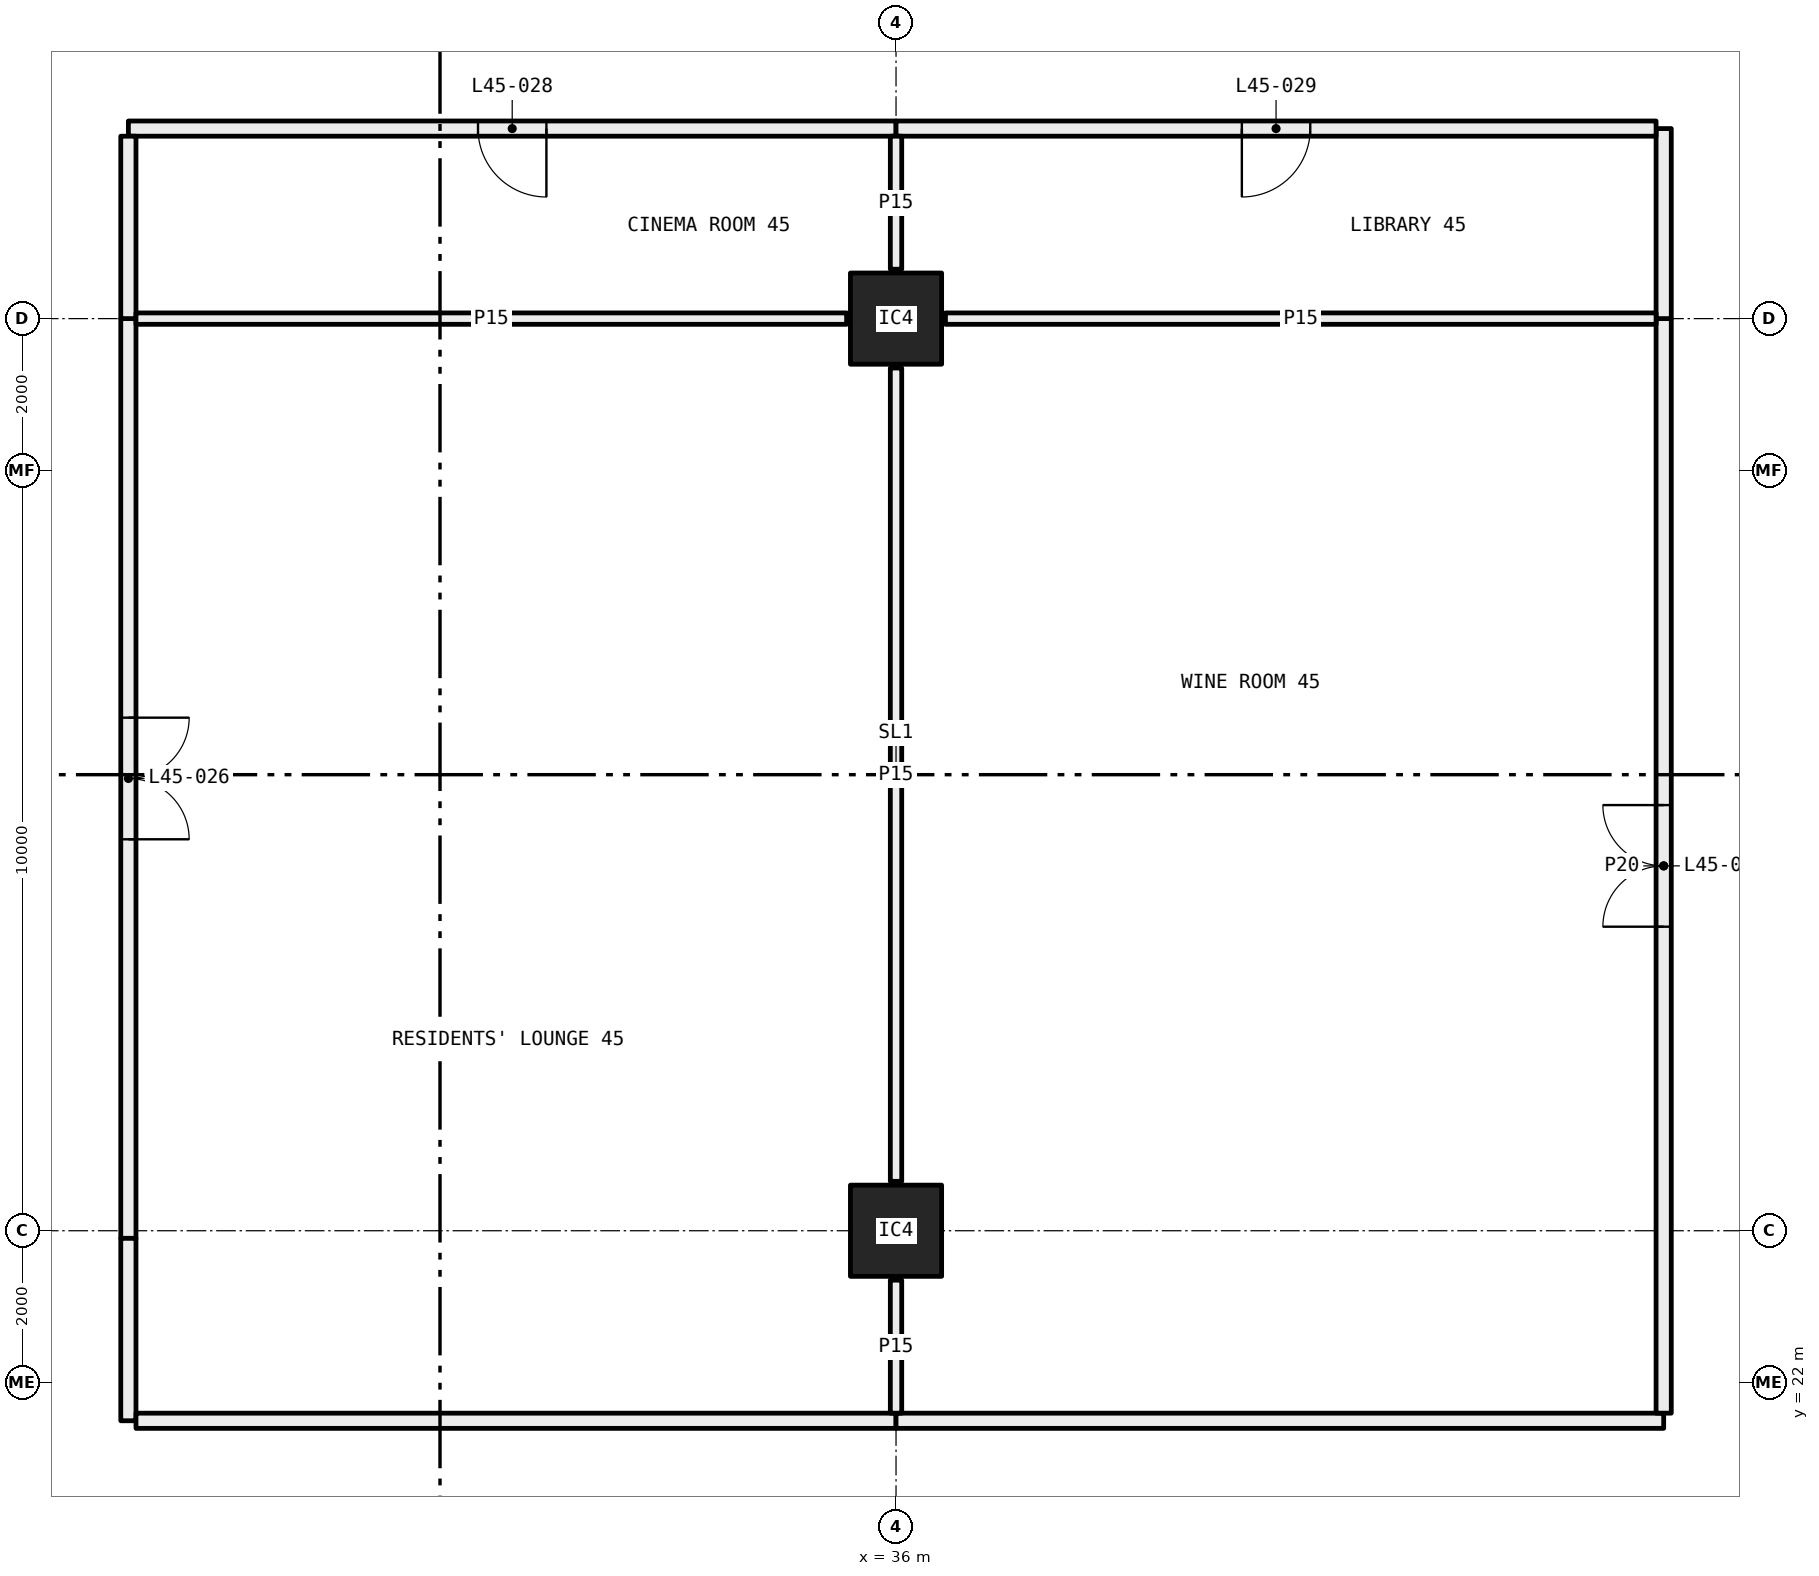
"""IFC4 building model, lengths in metres.
Left out: names, types, materials, properties, quantities, classifications, styles, units other than length and angle.
Written with IfcOpenShell. Run it as: python <this file> out.ifc"""

import sys

from ifc_helpers import new_model, si_unit, direction, frame, frame_2d, origin, origin_2d, place, context, subcontext, project, spatial, rectangle, hollow_rectangle, extrude, element, fill, save


model = new_model("IFC4")
c1 = context("Model", 3, precision=1e-05, world=origin(), true_north=direction((0.0, 1.0)))
c2 = subcontext(c1, "Body", "Model", "MODEL_VIEW")
j1 = project(units=[si_unit("LENGTHUNIT", "METRE"), si_unit("PLANEANGLEUNIT", "RADIAN")], contexts=[c1])
p1 = place(None, origin())
s1 = spatial("IfcSite", under=j1, at=p1, CompositionType="ELEMENT")
p2 = place(p1, origin())
s2 = spatial("IfcBuilding", under=s1, at=p2, CompositionType="ELEMENT")
p3 = place(p2, frame((0.0, 0.0, 172.05)))
s3 = spatial("IfcBuildingStorey", under=s2, at=p3, CompositionType="ELEMENT", Elevation=172.05)
for number, where, z_axis, x_axis in (
    (1, (36.0, 24.0, 0.0), (0.0, 0.0, 1.0), (1.0, 0.0, 0.0)),
    (2, (36.0, 36.0, 0.0), (0.0, 0.0, 1.0), (1.0, 0.0, 0.0)),
):
    element("IfcColumn", number, at=place(p3, frame(where, z_axis=z_axis, x_axis=x_axis)), inside=s3, PredefinedType="COLUMN", context=c2, shape_type="SweptSolid", body=[
        extrude(hollow_rectangle(XDim=1.2, YDim=1.2, WallThickness=0.05, at=origin_2d()), origin(), (0.0, 0.0, 1.0), 3.05),
    ])
p4 = place(p3, frame((25.9, 36.0, 0.0), z_axis=(0.0, 0.0, 1.0), x_axis=(0.0, -1.0, 0.0)))
e3 = element("IfcWall", 3, at=p4, inside=s3, PredefinedType="PARTITIONING", context=c2, shape_type="SweptSolid", body=[
    extrude(rectangle(XDim=12.1, YDim=0.2, at=frame_2d((6.05, 0.0))), origin(), (0.0, 0.0, 1.0), 2.45),
])
p5 = place(p4, frame((5.25, 0.0, 0.0)))
e4 = element("IfcOpeningElement", 4, at=p5, cuts=e3, PredefinedType="OPENING", context=c2, shape_type="SweptSolid", body=[
    extrude(rectangle(XDim=1.6, YDim=2.1, at=frame_2d((0.8, 1.05))), frame((0.0, 0.11, 0.0), z_axis=(0.0, -1.0, 0.0), x_axis=(1.0, 0.0, 0.0)), (0.0, 0.0, 1.0), 0.22),
])
p6 = place(p3, frame((25.9, 23.9, 0.0), z_axis=(0.0, 0.0, 1.0), x_axis=(0.0, -1.0, 0.0)))
e5 = element("IfcWall", 5, at=p6, inside=s3, PredefinedType="PARTITIONING", context=c2, shape_type="SweptSolid", body=[
    extrude(rectangle(XDim=2.4, YDim=0.2, at=frame_2d((1.2, 0.0))), origin(), (0.0, 0.0, 1.0), 3.05),
])
p7 = place(p3, frame((26.0, 21.5, 0.0), z_axis=(0.0, 0.0, 1.0), x_axis=(1.0, 0.0, 0.0)))
e6 = element("IfcWall", 6, at=p7, inside=s3, PredefinedType="PARTITIONING", context=c2, shape_type="SweptSolid", body=[
    extrude(rectangle(XDim=10.0, YDim=0.2, at=frame_2d((5.0, 0.0))), origin(), (0.0, 0.0, 1.0), 2.45),
])
p8 = place(p3, frame((36.0, 21.5, 0.0), z_axis=(0.0, 0.0, 1.0), x_axis=(1.0, 0.0, 0.0)))
e7 = element("IfcWall", 7, at=p8, inside=s3, PredefinedType="PARTITIONING", context=c2, shape_type="SweptSolid", body=[
    extrude(rectangle(XDim=10.1, YDim=0.2, at=frame_2d((5.05, 0.0))), origin(), (0.0, 0.0, 1.0), 2.45),
])
p9 = place(p3, frame((46.1, 21.6, 0.0), z_axis=(0.0, 0.0, 1.0), x_axis=(0.0, 1.0, 0.0)))
e8 = element("IfcWall", 8, at=p9, inside=s3, PredefinedType="PARTITIONING", context=c2, shape_type="SweptSolid", body=[
    extrude(rectangle(XDim=14.4, YDim=0.2, at=frame_2d((7.2, 0.0))), origin(), (0.0, 0.0, 1.0), 2.45),
])
p10 = place(p9, frame((6.4, 0.0, 0.0)))
e9 = element("IfcOpeningElement", 9, at=p10, cuts=e8, PredefinedType="OPENING", context=c2, shape_type="SweptSolid", body=[
    extrude(rectangle(XDim=1.6, YDim=2.1, at=frame_2d((0.8, 1.05))), frame((0.0, 0.11, 0.0), z_axis=(0.0, -1.0, 0.0), x_axis=(1.0, 0.0, 0.0)), (0.0, 0.0, 1.0), 0.22),
])
p11 = place(p3, frame((36.0, 38.5, 0.0), z_axis=(0.0, 0.0, 1.0), x_axis=(-1.0, 0.0, 0.0)))
e10 = element("IfcWall", 10, at=p11, inside=s3, PredefinedType="PARTITIONING", context=c2, shape_type="SweptSolid", body=[
    extrude(rectangle(XDim=10.1, YDim=0.2, at=frame_2d((5.05, 0.0))), origin(), (0.0, 0.0, 1.0), 2.45),
])
p12 = place(p11, frame((4.6, 0.0, 0.0)))
e11 = element("IfcOpeningElement", 11, at=p12, cuts=e10, PredefinedType="OPENING", context=c2, shape_type="SweptSolid", body=[
    extrude(rectangle(XDim=0.9, YDim=2.1, at=frame_2d((0.45, 1.05))), frame((0.0, 0.11, 0.0), z_axis=(0.0, -1.0, 0.0), x_axis=(1.0, 0.0, 0.0)), (0.0, 0.0, 1.0), 0.22),
])
p13 = place(p3, frame((25.9, 38.4, 0.0), z_axis=(0.0, 0.0, 1.0), x_axis=(0.0, -1.0, 0.0)))
e12 = element("IfcWall", 12, at=p13, inside=s3, PredefinedType="PARTITIONING", context=c2, shape_type="SweptSolid", body=[
    extrude(rectangle(XDim=2.4, YDim=0.2, at=frame_2d((1.2, 0.0))), origin(), (0.0, 0.0, 1.0), 2.45),
])
p14 = place(p3, frame((46.1, 36.0, 0.0), z_axis=(0.0, 0.0, 1.0), x_axis=(0.0, 1.0, 0.0)))
e13 = element("IfcWall", 13, at=p14, inside=s3, PredefinedType="PARTITIONING", context=c2, shape_type="SweptSolid", body=[
    extrude(rectangle(XDim=2.5, YDim=0.2, at=frame_2d((1.25, 0.0))), origin(), (0.0, 0.0, 1.0), 2.45),
])
p15 = place(p3, frame((46.0, 38.5, 0.0), z_axis=(0.0, 0.0, 1.0), x_axis=(-1.0, 0.0, 0.0)))
e14 = element("IfcWall", 14, at=p15, inside=s3, PredefinedType="PARTITIONING", context=c2, shape_type="SweptSolid", body=[
    extrude(rectangle(XDim=10.0, YDim=0.2, at=frame_2d((5.0, 0.0))), origin(), (0.0, 0.0, 1.0), 2.45),
])
p16 = place(p15, frame((4.55, 0.0, 0.0)))
e15 = element("IfcOpeningElement", 15, at=p16, cuts=e14, PredefinedType="OPENING", context=c2, shape_type="SweptSolid", body=[
    extrude(rectangle(XDim=0.9, YDim=2.1, at=frame_2d((0.45, 1.05))), frame((0.0, 0.11, 0.0), z_axis=(0.0, -1.0, 0.0), x_axis=(1.0, 0.0, 0.0)), (0.0, 0.0, 1.0), 0.22),
])
p17 = place(p3, frame((36.0, 21.6, 0.0), z_axis=(0.0, 0.0, 1.0), x_axis=(0.0, 1.0, 0.0)))
e16 = element("IfcWall", 16, at=p17, inside=s3, PredefinedType="PARTITIONING", context=c2, shape_type="SweptSolid", body=[
    extrude(rectangle(XDim=1.75, YDim=0.15, at=frame_2d((0.875, 0.0))), origin(), (0.0, 0.0, 1.0), 2.45),
])
p18 = place(p3, frame((36.0, 24.65, 0.0), z_axis=(0.0, 0.0, 1.0), x_axis=(0.0, 1.0, 0.0)))
e17 = element("IfcWall", 17, at=p18, inside=s3, PredefinedType="PARTITIONING", context=c2, shape_type="SweptSolid", body=[
    extrude(rectangle(XDim=10.7, YDim=0.15, at=frame_2d((5.35, 0.0))), origin(), (0.0, 0.0, 1.0), 2.45),
])
for number, where, z_axis, x_axis in (
    (18, (35.35, 36.0, 0.0), (0.0, 0.0, 1.0), (-1.0, 0.0, 0.0)),
    (19, (46.0, 36.0, 0.0), (0.0, 0.0, 1.0), (-1.0, 0.0, 0.0)),
):
    element("IfcWall", number, at=place(p3, frame(where, z_axis=z_axis, x_axis=x_axis)), inside=s3, PredefinedType="PARTITIONING", context=c2, shape_type="SweptSolid", body=[
        extrude(rectangle(XDim=9.35, YDim=0.15, at=frame_2d((4.675, 0.0))), origin(), (0.0, 0.0, 1.0), 2.45),
    ])
p19 = place(p3, frame((36.0, 36.65, 0.0), z_axis=(0.0, 0.0, 1.0), x_axis=(0.0, 1.0, 0.0)))
e20 = element("IfcWall", 20, at=p19, inside=s3, PredefinedType="PARTITIONING", context=c2, shape_type="SweptSolid", body=[
    extrude(rectangle(XDim=1.75, YDim=0.15, at=frame_2d((0.875, 0.0))), origin(), (0.0, 0.0, 1.0), 2.45),
])
p20 = place(p5, origin())
e21 = element("IfcDoor", 21, at=p20, inside=s3, OperationType="DOUBLE_DOOR_SINGLE_SWING", PredefinedType="DOOR", context=c2, shape_type="SweptSolid", body=[
    extrude(rectangle(XDim=1.6, YDim=2.1, at=frame_2d((0.8, 1.05))), frame((0.0, 0.025, 0.0), z_axis=(0.0, -1.0, 0.0), x_axis=(1.0, 0.0, 0.0)), (0.0, 0.0, 1.0), 0.05),
])
fill(e4, e21)
p21 = place(p10, origin())
e22 = element("IfcDoor", 22, at=p21, inside=s3, OperationType="DOUBLE_DOOR_SINGLE_SWING", PredefinedType="DOOR", context=c2, shape_type="SweptSolid", body=[
    extrude(rectangle(XDim=1.6, YDim=2.1, at=frame_2d((0.8, 1.05))), frame((0.0, 0.025, 0.0), z_axis=(0.0, -1.0, 0.0), x_axis=(1.0, 0.0, 0.0)), (0.0, 0.0, 1.0), 0.05),
])
fill(e9, e22)
p22 = place(p12, origin())
e23 = element("IfcDoor", 23, at=p22, inside=s3, OperationType="SINGLE_SWING_RIGHT", PredefinedType="DOOR", context=c2, shape_type="SweptSolid", body=[
    extrude(rectangle(XDim=0.9, YDim=2.1, at=frame_2d((0.45, 1.05))), frame((0.0, 0.025, 0.0), z_axis=(0.0, -1.0, 0.0), x_axis=(1.0, 0.0, 0.0)), (0.0, 0.0, 1.0), 0.05),
])
fill(e11, e23)
p23 = place(p16, origin())
e24 = element("IfcDoor", 24, at=p23, inside=s3, OperationType="SINGLE_SWING_LEFT", PredefinedType="DOOR", context=c2, shape_type="SweptSolid", body=[
    extrude(rectangle(XDim=0.9, YDim=2.1, at=frame_2d((0.45, 1.05))), frame((0.0, 0.025, 0.0), z_axis=(0.0, -1.0, 0.0), x_axis=(1.0, 0.0, 0.0)), (0.0, 0.0, 1.0), 0.05),
])
fill(e15, e24)
save(model, sys.argv[1])
